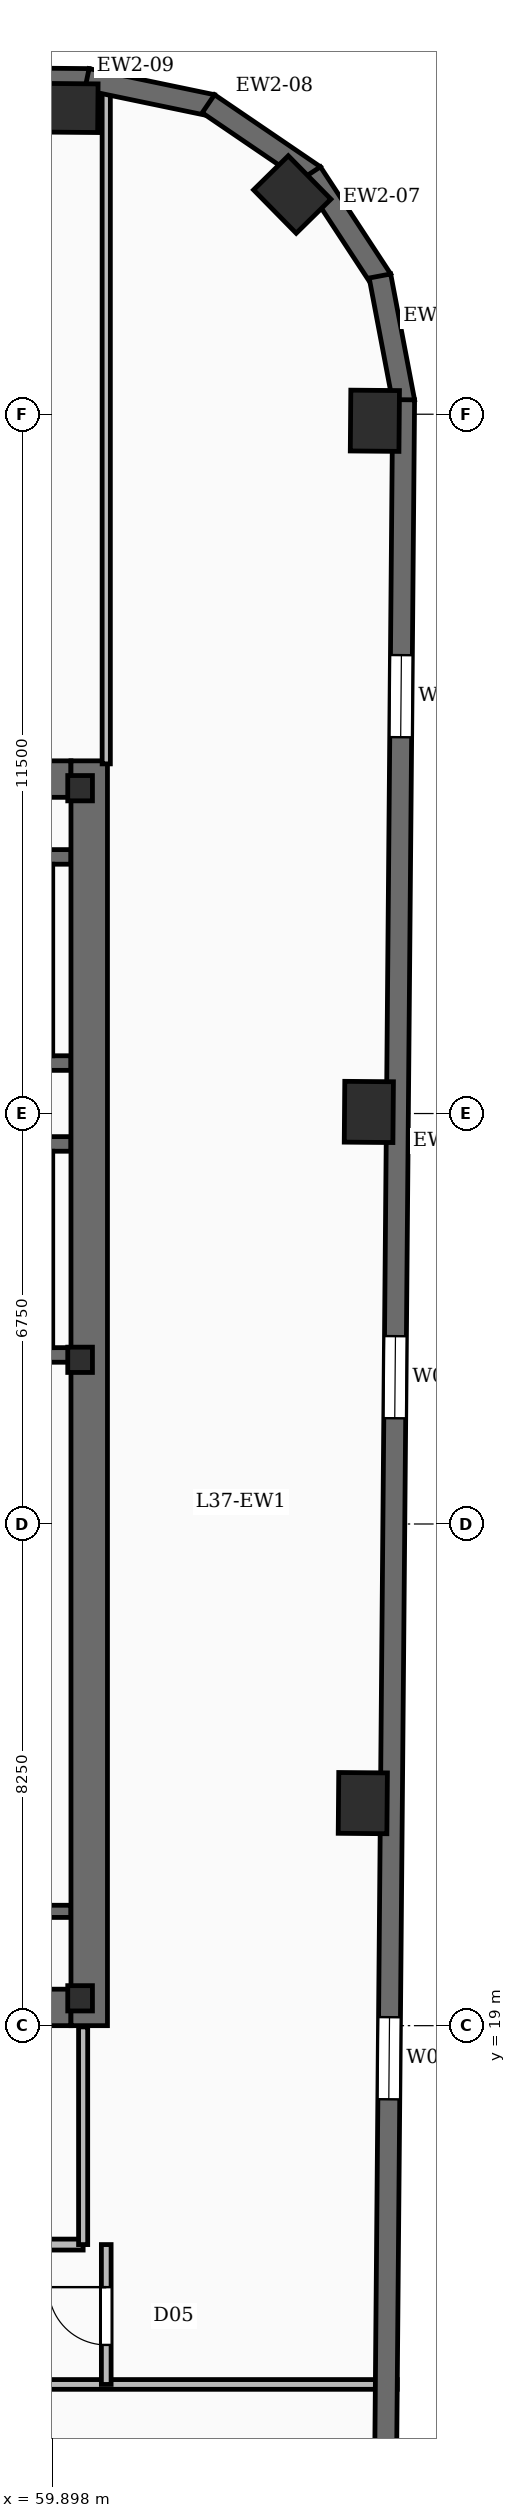
"""IFC4 building model, lengths in metres.
Left out: names, types, materials, properties, quantities, classifications, styles, units other than length and angle.
Written with IfcOpenShell. Run it as: python <this file> out.ifc"""

import sys

from ifc_helpers import new_model, si_unit, direction, frame, frame_2d, origin, origin_2d, place, context, subcontext, project, spatial, rectangle, i_section, extrude, element, fill, save


model = new_model("IFC4")
c1 = context("Model", 3, precision=1e-05, world=origin(), true_north=direction((0.0, 1.0)))
c2 = subcontext(c1, "Body", "Model", "MODEL_VIEW")
j1 = project(units=[si_unit("LENGTHUNIT", "METRE"), si_unit("PLANEANGLEUNIT", "RADIAN")], contexts=[c1])
p1 = place(None, origin())
s1 = spatial("IfcSite", under=j1, at=p1, CompositionType="ELEMENT")
p2 = place(p1, origin())
s2 = spatial("IfcBuilding", under=s1, at=p2, CompositionType="ELEMENT")
p3 = place(p2, frame((0.0, 0.0, 158.45)))
s3 = spatial("IfcBuildingStorey", under=s2, at=p3, CompositionType="ELEMENT", Elevation=158.45)
p4 = place(p3, frame((60.5, 19.0, -0.45), z_axis=(0.0, 0.0, 1.0), x_axis=(0.0, 1.0, 0.0)))
e1 = element("IfcWall", 1, at=p4, inside=s3, PredefinedType="SHEAR", context=c2, shape_type="SweptSolid", body=[
    extrude(rectangle(XDim=20.8, YDim=0.6, at=frame_2d((10.4, 0.0))), origin(), (0.0, 0.0, 1.0), 3.93),
])
for number, where, z_axis, x_axis in (
    (2, (50.7, 19.3, -0.45), (0.0, 0.0, 1.0), (1.0, 0.0, 0.0)),
    (3, (50.7, 39.5, -0.45), (0.0, 0.0, 1.0), (1.0, 0.0, 0.0)),
):
    element("IfcWall", number, at=place(p3, frame(where, z_axis=z_axis, x_axis=x_axis)), inside=s3, PredefinedType="SHEAR", context=c2, shape_type="SweptSolid", body=[
        extrude(rectangle(XDim=9.5, YDim=0.6, at=frame_2d((4.75, 0.0))), origin(), (0.0, 0.0, 1.0), 3.93),
    ])
for number, where, z_axis, x_axis in (
    (4, (60.35, 19.45, -0.45), (0.0, 0.0, 1.0), (1.0, 0.0, 0.0)),
    (5, (60.35, 29.95, -0.45), (0.0, 0.0, 1.0), (1.0, 0.0, 0.0)),
    (6, (60.35, 39.35, -0.45), (0.0, 0.0, 1.0), (1.0, 0.0, 0.0)),
):
    element("IfcColumn", number, at=place(p3, frame(where, z_axis=z_axis, x_axis=x_axis)), inside=s3, PredefinedType="COLUMN", context=c2, shape_type="SweptSolid", body=[
        extrude(i_section(OverallWidth=0.406, OverallDepth=0.416, WebThickness=0.03, FlangeThickness=0.048, FilletRadius=0.02, at=origin_2d()), origin(), (0.0, 0.0, 1.0), 3.93),
    ])
for number, where, z_axis, x_axis in (
    (7, (64.999, 22.66, -0.45), (0.0, 0.0, 1.0), (0.009, 1.0, 0.0)),
    (8, (65.098, 34.026, -0.45), (0.0, 0.0, 1.0), (0.009, 1.0, 0.0)),
    (9, (65.198, 45.392, -0.45), (0.0, 0.0, 1.0), (0.009, 1.0, 0.0)),
    (10, (63.839, 49.113, -0.45), (0.0, 0.0, 1.0), (-0.701, 0.713, 0.0)),
    (11, (60.142, 50.537, -0.45), (0.0, 0.0, 1.0), (1.0, -0.009, 0.0)),
):
    element("IfcColumn", number, at=place(p3, frame(where, z_axis=z_axis, x_axis=x_axis)), inside=s3, PredefinedType="COLUMN", context=c2, shape_type="SweptSolid", body=[
        extrude(rectangle(XDim=1.0, YDim=0.8, at=origin_2d()), origin(), (0.0, 0.0, 1.0), 3.93),
    ])
p5 = place(p3, frame((65.671, 45.738, 0.0), z_axis=(0.0, 0.0, 1.0), x_axis=(-0.008727348535, -0.999961915969, 0.0)))
e12 = element("IfcWall", 12, at=p5, inside=s3, PredefinedType="SOLIDWALL", context=c2, shape_type="SweptSolid", body=[
    extrude(rectangle(XDim=34.8, YDim=0.36, at=frame_2d((17.4, 0.0))), origin(), (0.0, 0.0, 1.0), 3.48),
])
p6 = place(p5, frame((4.2, 0.0, 0.88)))
e13 = element("IfcOpeningElement", 13, at=p6, cuts=e12, PredefinedType="OPENING", context=c2, shape_type="SweptSolid", body=[
    extrude(rectangle(XDim=1.35, YDim=2.2, at=frame_2d((0.675, 1.1))), frame((0.0, 0.19, 0.0), z_axis=(0.0, -1.0, 0.0), x_axis=(1.0, 0.0, 0.0)), (0.0, 0.0, 1.0), 0.38),
])
p7 = place(p5, frame((15.4, 0.0, 0.88)))
e14 = element("IfcOpeningElement", 14, at=p7, cuts=e12, PredefinedType="OPENING", context=c2, shape_type="SweptSolid", body=[
    extrude(rectangle(XDim=1.35, YDim=2.2, at=frame_2d((0.675, 1.1))), frame((0.0, 0.19, 0.0), z_axis=(0.0, -1.0, 0.0), x_axis=(1.0, 0.0, 0.0)), (0.0, 0.0, 1.0), 0.38),
])
p8 = place(p5, frame((26.6, 0.0, 0.88)))
e15 = element("IfcOpeningElement", 15, at=p8, cuts=e12, PredefinedType="OPENING", context=c2, shape_type="SweptSolid", body=[
    extrude(rectangle(XDim=1.35, YDim=2.2, at=frame_2d((0.675, 1.1))), frame((0.0, 0.19, 0.0), z_axis=(0.0, -1.0, 0.0), x_axis=(1.0, 0.0, 0.0)), (0.0, 0.0, 1.0), 0.38),
])
p9 = place(p3, frame((65.281, 47.773, 0.0), z_axis=(0.0, 0.0, 1.0), x_axis=(0.186435855703, -0.98246713518, 0.0)))
e16 = element("IfcWall", 16, at=p9, inside=s3, PredefinedType="SOLIDWALL", context=c2, shape_type="SweptSolid", body=[
    extrude(rectangle(XDim=2.107, YDim=0.36, at=frame_2d((1.053, 0.0))), origin(), (0.0, 0.0, 1.0), 3.48),
])
p10 = place(p3, frame((64.152, 49.47, 0.0), z_axis=(0.0, 0.0, 1.0), x_axis=(0.548238722478, -0.83632188969, 0.0)))
e17 = element("IfcWall", 17, at=p10, inside=s3, PredefinedType="SOLIDWALL", context=c2, shape_type="SweptSolid", body=[
    extrude(rectangle(XDim=2.107, YDim=0.36, at=frame_2d((1.053, 0.0))), origin(), (0.0, 0.0, 1.0), 3.48),
])
p11 = place(p3, frame((62.459, 50.606, 0.0), z_axis=(0.0, 0.0, 1.0), x_axis=(0.826609569219, -0.56277581689, 0.0)))
e18 = element("IfcWall", 18, at=p11, inside=s3, PredefinedType="SOLIDWALL", context=c2, shape_type="SweptSolid", body=[
    extrude(rectangle(XDim=2.107, YDim=0.36, at=frame_2d((1.053, 0.0))), origin(), (0.0, 0.0, 1.0), 3.48),
])
p12 = place(p3, frame((60.461, 51.007, 0.0), z_axis=(0.0, 0.0, 1.0), x_axis=(0.979059388908, -0.203574833883, 0.0)))
e19 = element("IfcWall", 19, at=p12, inside=s3, PredefinedType="SOLIDWALL", context=c2, shape_type="SweptSolid", body=[
    extrude(rectangle(XDim=2.107, YDim=0.36, at=frame_2d((1.054, 0.0))), origin(), (0.0, 0.0, 1.0), 3.48),
])
p13 = place(p3, frame((11.098, 51.435, 0.0), z_axis=(0.0, 0.0, 1.0), x_axis=(0.99996191194, -0.008727810138, 0.0)))
e20 = element("IfcWall", 20, at=p13, inside=s3, PredefinedType="SOLIDWALL", context=c2, shape_type="SweptSolid", body=[
    extrude(rectangle(XDim=49.4, YDim=0.36, at=frame_2d((24.7, 0.0))), origin(), (0.0, 0.0, 1.0), 3.48),
])
p14 = place(p13, frame((27.6, 0.0, 0.0)))
e21 = element("IfcOpeningElement", 21, at=p14, cuts=e20, PredefinedType="OPENING", context=c2, shape_type="SweptSolid", body=[
    extrude(rectangle(XDim=1.8, YDim=2.25, at=frame_2d((0.9, 1.125))), frame((0.0, 0.19, 0.0), z_axis=(0.0, -1.0, 0.0), x_axis=(1.0, 0.0, 0.0)), (0.0, 0.0, 1.0), 0.38),
])
p15 = place(p13, frame((8.0, 0.0, 0.88)))
e22 = element("IfcOpeningElement", 22, at=p15, cuts=e20, PredefinedType="OPENING", context=c2, shape_type="SweptSolid", body=[
    extrude(rectangle(XDim=1.8, YDim=2.15, at=frame_2d((0.9, 1.075))), frame((0.0, 0.19, 0.0), z_axis=(0.0, -1.0, 0.0), x_axis=(1.0, 0.0, 0.0)), (0.0, 0.0, 1.0), 0.38),
])
p16 = place(p13, frame((18.8, 0.0, 0.88)))
e23 = element("IfcOpeningElement", 23, at=p16, cuts=e20, PredefinedType="OPENING", context=c2, shape_type="SweptSolid", body=[
    extrude(rectangle(XDim=1.8, YDim=2.15, at=frame_2d((0.9, 1.075))), frame((0.0, 0.19, 0.0), z_axis=(0.0, -1.0, 0.0), x_axis=(1.0, 0.0, 0.0)), (0.0, 0.0, 1.0), 0.38),
])
p17 = place(p13, frame((40.4, 0.0, 0.88)))
e24 = element("IfcOpeningElement", 24, at=p17, cuts=e20, PredefinedType="OPENING", context=c2, shape_type="SweptSolid", body=[
    extrude(rectangle(XDim=1.8, YDim=2.15, at=frame_2d((0.9, 1.075))), frame((0.0, 0.19, 0.0), z_axis=(0.0, -1.0, 0.0), x_axis=(1.0, 0.0, 0.0)), (0.0, 0.0, 1.0), 0.38),
])
p18 = place(p3, frame((60.2, 30.03, 0.0), z_axis=(0.0, 0.0, 1.0), x_axis=(-1.0, 0.0, 0.0)))
e25 = element("IfcWall", 25, at=p18, inside=s3, PredefinedType="SOLIDWALL", context=c2, shape_type="SweptSolid", body=[
    extrude(rectangle(XDim=9.5, YDim=0.24, at=frame_2d((4.75, 0.0))), origin(), (0.0, 0.0, 1.0), 3.48),
])
p19 = place(p18, frame((7.68, 0.0, 0.0)))
e26 = element("IfcOpeningElement", 26, at=p19, cuts=e25, PredefinedType="OPENING", context=c2, shape_type="SweptSolid", body=[
    extrude(rectangle(XDim=1.1, YDim=2.15, at=frame_2d((0.55, 1.075))), frame((0.0, 0.13, 0.0), z_axis=(0.0, -1.0, 0.0), x_axis=(1.0, 0.0, 0.0)), (0.0, 0.0, 1.0), 0.26),
])
p20 = place(p3, frame((50.7, 33.5, 0.0), z_axis=(0.0, 0.0, 1.0), x_axis=(1.0, 0.0, 0.0)))
e27 = element("IfcWall", 27, at=p20, inside=s3, PredefinedType="SOLIDWALL", context=c2, shape_type="SweptSolid", body=[
    extrude(rectangle(XDim=9.5, YDim=0.24, at=frame_2d((4.75, 0.0))), origin(), (0.0, 0.0, 1.0), 3.48),
])
p21 = place(p3, frame((59.78, 30.15, 0.0), z_axis=(0.0, 0.0, 1.0), x_axis=(0.0, 1.0, 0.0)))
e28 = element("IfcWall", 28, at=p21, inside=s3, PredefinedType="SOLIDWALL", context=c2, shape_type="SweptSolid", body=[
    extrude(rectangle(XDim=3.23, YDim=0.24, at=frame_2d((1.615, 0.0))), origin(), (0.0, 0.0, 1.0), 3.48),
])
p22 = place(p3, frame((60.2, 34.83, 0.0), z_axis=(0.0, 0.0, 1.0), x_axis=(-1.0, 0.0, 0.0)))
e29 = element("IfcWall", 29, at=p22, inside=s3, PredefinedType="SOLIDWALL", context=c2, shape_type="SweptSolid", body=[
    extrude(rectangle(XDim=9.5, YDim=0.24, at=frame_2d((4.75, 0.0))), origin(), (0.0, 0.0, 1.0), 3.48),
])
p23 = place(p22, frame((7.72, 0.0, 0.0)))
e30 = element("IfcOpeningElement", 30, at=p23, cuts=e29, PredefinedType="OPENING", context=c2, shape_type="SweptSolid", body=[
    extrude(rectangle(XDim=1.1, YDim=2.15, at=frame_2d((0.55, 1.075))), frame((0.0, 0.13, 0.0), z_axis=(0.0, -1.0, 0.0), x_axis=(1.0, 0.0, 0.0)), (0.0, 0.0, 1.0), 0.26),
])
p24 = place(p3, frame((50.7, 38.22, 0.0), z_axis=(0.0, 0.0, 1.0), x_axis=(1.0, 0.0, 0.0)))
e31 = element("IfcWall", 31, at=p24, inside=s3, PredefinedType="SOLIDWALL", context=c2, shape_type="SweptSolid", body=[
    extrude(rectangle(XDim=9.5, YDim=0.24, at=frame_2d((4.75, 0.0))), origin(), (0.0, 0.0, 1.0), 3.48),
])
p25 = place(p3, frame((59.78, 34.95, 0.0), z_axis=(0.0, 0.0, 1.0), x_axis=(0.0, 1.0, 0.0)))
e32 = element("IfcWall", 32, at=p25, inside=s3, PredefinedType="SOLIDWALL", context=c2, shape_type="SweptSolid", body=[
    extrude(rectangle(XDim=3.15, YDim=0.24, at=frame_2d((1.575, 0.0))), origin(), (0.0, 0.0, 1.0), 3.48),
])
p26 = place(p3, frame((50.7, 20.88, 0.0), z_axis=(0.0, 0.0, 1.0), x_axis=(1.0, 0.0, 0.0)))
e33 = element("IfcWall", 33, at=p26, inside=s3, PredefinedType="SOLIDWALL", context=c2, shape_type="SweptSolid", body=[
    extrude(rectangle(XDim=9.5, YDim=0.2, at=frame_2d((4.75, 0.0))), origin(), (0.0, 0.0, 1.0), 2.54),
])
p27 = place(p26, frame((1.4, 0.0, 0.0)))
e34 = element("IfcOpeningElement", 34, at=p27, cuts=e33, PredefinedType="OPENING", context=c2, shape_type="SweptSolid", body=[
    extrude(rectangle(XDim=1.05, YDim=2.15, at=frame_2d((0.525, 1.075))), frame((0.0, 0.11, 0.0), z_axis=(0.0, -1.0, 0.0), x_axis=(1.0, 0.0, 0.0)), (0.0, 0.0, 1.0), 0.22),
])
p28 = place(p26, frame((5.5, 0.0, 0.0)))
e35 = element("IfcOpeningElement", 35, at=p28, cuts=e33, PredefinedType="OPENING", context=c2, shape_type="SweptSolid", body=[
    extrude(rectangle(XDim=1.05, YDim=2.15, at=frame_2d((0.525, 1.075))), frame((0.0, 0.11, 0.0), z_axis=(0.0, -1.0, 0.0), x_axis=(1.0, 0.0, 0.0)), (0.0, 0.0, 1.0), 0.22),
])
p29 = place(p3, frame((50.4, 15.4, 0.0), z_axis=(0.0, 0.0, 1.0), x_axis=(1.0, 0.0, 0.0)))
e36 = element("IfcWall", 36, at=p29, inside=s3, PredefinedType="SOLIDWALL", context=c2, shape_type="SweptSolid", body=[
    extrude(rectangle(XDim=10.0, YDim=0.18, at=frame_2d((5.0, 0.0))), origin(), (0.0, 0.0, 1.0), 2.54),
])
p30 = place(p29, frame((1.19, 0.0, 0.0)))
e37 = element("IfcOpeningElement", 37, at=p30, cuts=e36, PredefinedType="OPENING", context=c2, shape_type="SweptSolid", body=[
    extrude(rectangle(XDim=0.92, YDim=2.1, at=frame_2d((0.46, 1.05))), frame((0.0, 0.1, 0.0), z_axis=(0.0, -1.0, 0.0), x_axis=(1.0, 0.0, 0.0)), (0.0, 0.0, 1.0), 0.2),
])
p31 = place(p29, frame((4.54, 0.0, 0.0)))
e38 = element("IfcOpeningElement", 38, at=p31, cuts=e36, PredefinedType="OPENING", context=c2, shape_type="SweptSolid", body=[
    extrude(rectangle(XDim=0.92, YDim=2.1, at=frame_2d((0.46, 1.05))), frame((0.0, 0.1, 0.0), z_axis=(0.0, -1.0, 0.0), x_axis=(1.0, 0.0, 0.0)), (0.0, 0.0, 1.0), 0.2),
])
p32 = place(p29, frame((7.92, 0.0, 0.0)))
e39 = element("IfcOpeningElement", 39, at=p32, cuts=e36, PredefinedType="OPENING", context=c2, shape_type="SweptSolid", body=[
    extrude(rectangle(XDim=0.86, YDim=2.05, at=frame_2d((0.43, 1.025))), frame((0.0, 0.1, 0.0), z_axis=(0.0, -1.0, 0.0), x_axis=(1.0, 0.0, 0.0)), (0.0, 0.0, 1.0), 0.2),
])
p33 = place(p3, frame((60.4, 15.4, 0.0), z_axis=(0.0, 0.0, 1.0), x_axis=(0.0, 1.0, 0.0)))
e40 = element("IfcWall", 40, at=p33, inside=s3, PredefinedType="PARTITIONING", context=c2, shape_type="SweptSolid", body=[
    extrude(rectangle(XDim=3.58, YDim=0.15, at=frame_2d((1.79, 0.0))), origin(), (0.0, 0.0, 1.0), 2.54),
])
p34 = place(p3, frame((5.364, 13.1, 0.0), z_axis=(0.0, 0.0, 1.0), x_axis=(1.0, 0.0, 0.0)))
e41 = element("IfcWall", 41, at=p34, inside=s3, PredefinedType="PARTITIONING", context=c2, shape_type="SweptSolid", body=[
    extrude(rectangle(XDim=60.202, YDim=0.16, at=frame_2d((30.101, 0.0))), origin(), (0.0, 0.0, 1.0), 2.54),
])
p35 = place(p34, frame((14.361, 0.0, 0.0)))
e42 = element("IfcOpeningElement", 42, at=p35, cuts=e41, PredefinedType="OPENING", context=c2, shape_type="SweptSolid", body=[
    extrude(rectangle(XDim=0.95, YDim=2.15, at=frame_2d((0.475, 1.075))), frame((0.0, 0.09, 0.0), z_axis=(0.0, -1.0, 0.0), x_axis=(1.0, 0.0, 0.0)), (0.0, 0.0, 1.0), 0.18),
])
p36 = place(p34, frame((23.311, 0.0, 0.0)))
e43 = element("IfcOpeningElement", 43, at=p36, cuts=e41, PredefinedType="OPENING", context=c2, shape_type="SweptSolid", body=[
    extrude(rectangle(XDim=0.95, YDim=2.15, at=frame_2d((0.475, 1.075))), frame((0.0, 0.09, 0.0), z_axis=(0.0, -1.0, 0.0), x_axis=(1.0, 0.0, 0.0)), (0.0, 0.0, 1.0), 0.18),
])
p37 = place(p34, frame((36.161, 0.0, 0.0)))
e44 = element("IfcOpeningElement", 44, at=p37, cuts=e41, PredefinedType="OPENING", context=c2, shape_type="SweptSolid", body=[
    extrude(rectangle(XDim=0.95, YDim=2.15, at=frame_2d((0.475, 1.075))), frame((0.0, 0.09, 0.0), z_axis=(0.0, -1.0, 0.0), x_axis=(1.0, 0.0, 0.0)), (0.0, 0.0, 1.0), 0.18),
])
p38 = place(p34, frame((47.911, 0.0, 0.0)))
e45 = element("IfcOpeningElement", 45, at=p38, cuts=e41, PredefinedType="OPENING", context=c2, shape_type="SweptSolid", body=[
    extrude(rectangle(XDim=0.95, YDim=2.15, at=frame_2d((0.475, 1.075))), frame((0.0, 0.09, 0.0), z_axis=(0.0, -1.0, 0.0), x_axis=(1.0, 0.0, 0.0)), (0.0, 0.0, 1.0), 0.18),
])
p39 = place(p3, frame((60.78, 39.75, 0.0), z_axis=(0.0, 0.0, 1.0), x_axis=(0.0, 1.0, 0.0)))
e46 = element("IfcWall", 46, at=p39, inside=s3, PredefinedType="PARTITIONING", context=c2, shape_type="SweptSolid", body=[
    extrude(rectangle(XDim=11.13, YDim=0.135, at=frame_2d((5.565, 0.0))), origin(), (0.0, 0.0, 1.0), 2.54),
])
p40 = place(p3, frame((60.78, 13.1, 0.0), z_axis=(0.0, 0.0, 1.0), x_axis=(0.0, 1.0, 0.0)))
e47 = element("IfcWall", 47, at=p40, inside=s3, PredefinedType="PARTITIONING", context=c2, shape_type="SweptSolid", body=[
    extrude(rectangle(XDim=2.3, YDim=0.16, at=frame_2d((1.15, 0.0))), origin(), (0.0, 0.0, 1.0), 2.54),
])
p41 = place(p40, frame((0.65, 0.0, 0.0)))
e48 = element("IfcOpeningElement", 48, at=p41, cuts=e47, PredefinedType="OPENING", context=c2, shape_type="SweptSolid", body=[
    extrude(rectangle(XDim=0.95, YDim=2.15, at=frame_2d((0.475, 1.075))), frame((0.0, 0.09, 0.0), z_axis=(0.0, -1.0, 0.0), x_axis=(1.0, 0.0, 0.0)), (0.0, 0.0, 1.0), 0.18),
])
p42 = place(p6, origin())
e49 = element("IfcWindow", 49, at=p42, inside=s3, PartitioningType="SINGLE_PANEL", PredefinedType="WINDOW", context=c2, shape_type="SweptSolid", body=[
    extrude(rectangle(XDim=1.35, YDim=2.2, at=frame_2d((0.675, 1.1))), frame((0.0, 0.03, 0.0), z_axis=(0.0, -1.0, 0.0), x_axis=(1.0, 0.0, 0.0)), (0.0, 0.0, 1.0), 0.06),
])
fill(e13, e49)
p43 = place(p7, origin())
e50 = element("IfcWindow", 50, at=p43, inside=s3, PartitioningType="SINGLE_PANEL", PredefinedType="WINDOW", context=c2, shape_type="SweptSolid", body=[
    extrude(rectangle(XDim=1.35, YDim=2.2, at=frame_2d((0.675, 1.1))), frame((0.0, 0.03, 0.0), z_axis=(0.0, -1.0, 0.0), x_axis=(1.0, 0.0, 0.0)), (0.0, 0.0, 1.0), 0.06),
])
fill(e14, e50)
p44 = place(p8, origin())
e51 = element("IfcWindow", 51, at=p44, inside=s3, PartitioningType="SINGLE_PANEL", PredefinedType="WINDOW", context=c2, shape_type="SweptSolid", body=[
    extrude(rectangle(XDim=1.35, YDim=2.2, at=frame_2d((0.675, 1.1))), frame((0.0, 0.03, 0.0), z_axis=(0.0, -1.0, 0.0), x_axis=(1.0, 0.0, 0.0)), (0.0, 0.0, 1.0), 0.06),
])
fill(e15, e51)
p45 = place(p41, origin())
e52 = element("IfcDoor", 52, at=p45, inside=s3, OperationType="SINGLE_SWING_RIGHT", PredefinedType="DOOR", context=c2, shape_type="SweptSolid", body=[
    extrude(rectangle(XDim=0.95, YDim=2.15, at=frame_2d((0.475, 1.075))), frame((0.0, 0.025, 0.0), z_axis=(0.0, -1.0, 0.0), x_axis=(1.0, 0.0, 0.0)), (0.0, 0.0, 1.0), 0.05),
])
fill(e48, e52)
save(model, sys.argv[1])
